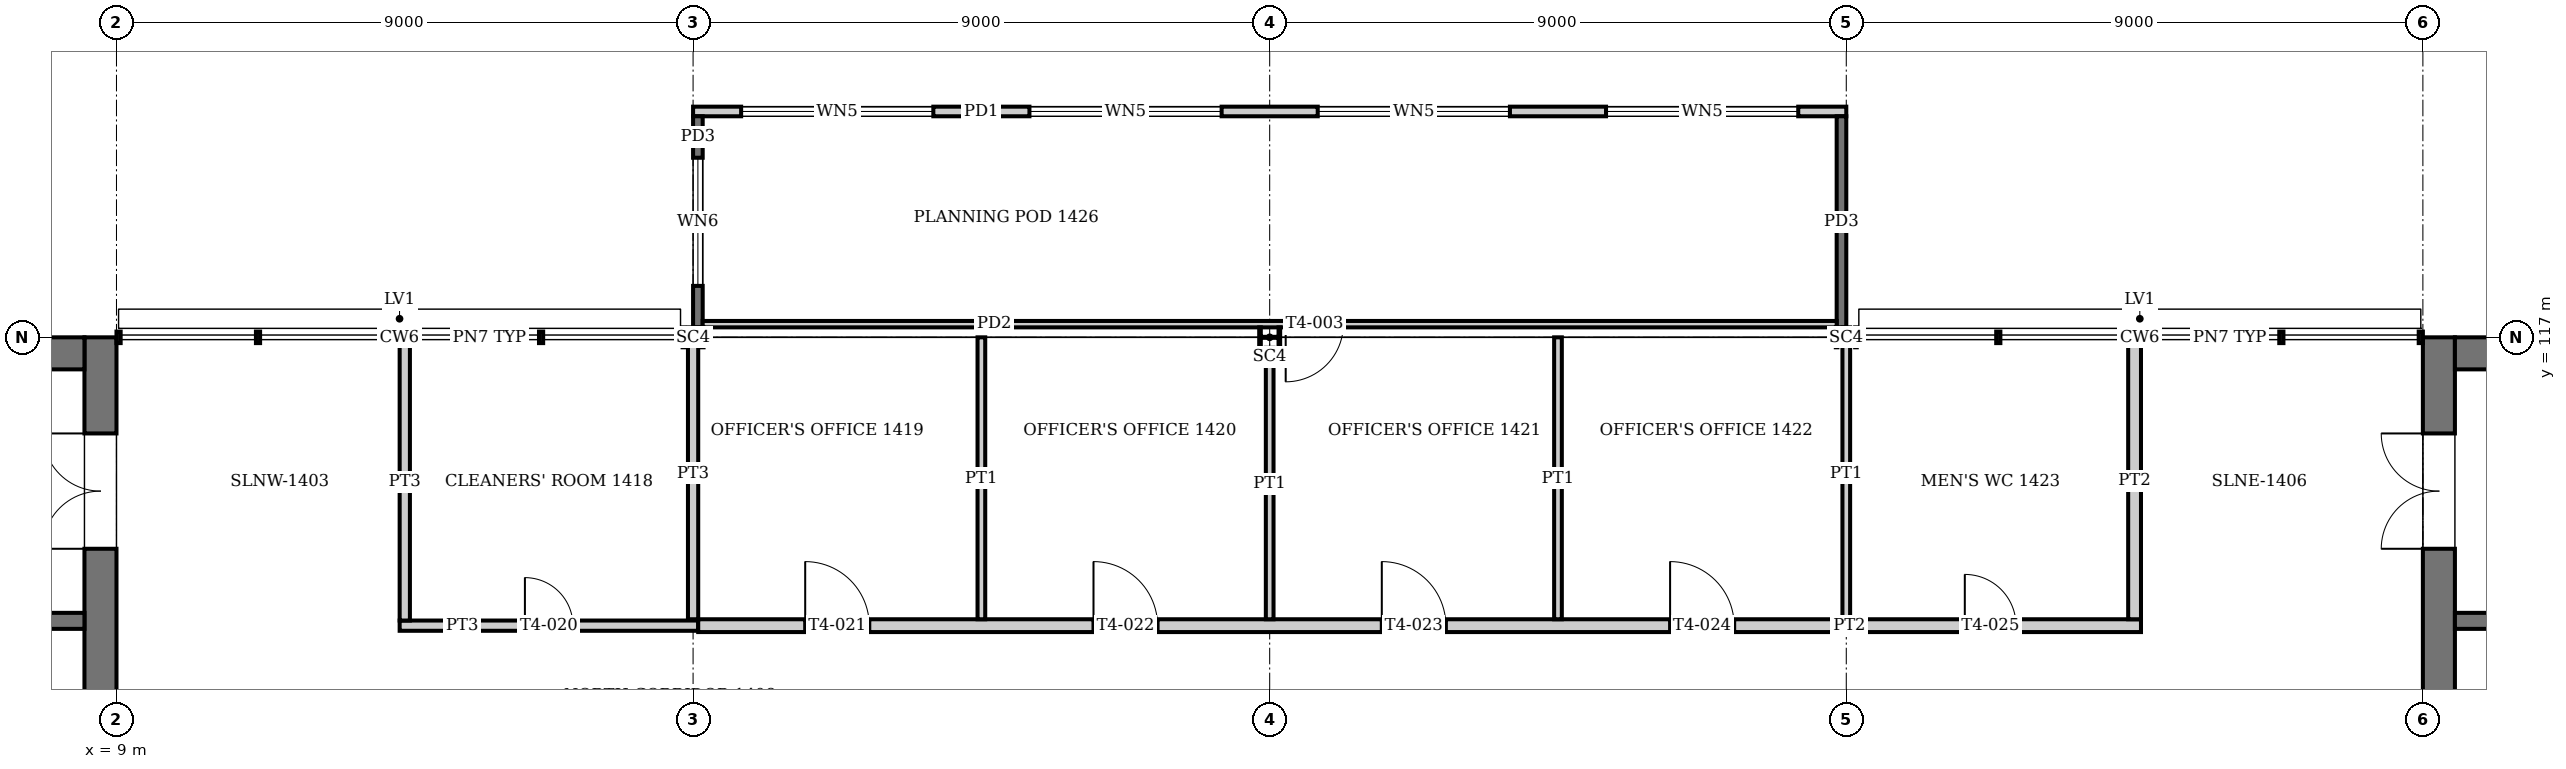
"""IFC4 building model, lengths in metres.
Left out: names, types, materials, properties, quantities, classifications, styles, units other than length and angle.
Written with IfcOpenShell. Run it as: python <this file> out.ifc"""

import sys

from ifc_helpers import new_model, si_unit, direction, frame, frame_2d, origin, origin_2d, place, context, subcontext, project, spatial, rectangle, i_section, extrude, element, fill, save


model = new_model("IFC4")
c1 = context("Model", 3, precision=1e-05, world=origin(), true_north=direction((0.0, 1.0)))
c2 = subcontext(c1, "Body", "Model", "MODEL_VIEW")
j1 = project(units=[si_unit("LENGTHUNIT", "METRE"), si_unit("PLANEANGLEUNIT", "RADIAN")], contexts=[c1])
p1 = place(None, origin())
s1 = spatial("IfcSite", under=j1, at=p1, CompositionType="ELEMENT")
p2 = place(p1, origin())
s2 = spatial("IfcBuilding", under=s1, at=p2, CompositionType="ELEMENT")
p3 = place(p2, frame((0.0, 0.0, 59.2)))
s3 = spatial("IfcBuildingStorey", under=s2, at=p3, CompositionType="ELEMENT", Elevation=59.2)
for number, where, z_axis, x_axis in (
    (1, (18.0, 117.0, 0.0), (0.0, 0.0, 1.0), (0.0, 1.0, 0.0)),
    (2, (27.0, 117.0, 0.0), (0.0, 0.0, 1.0), (0.0, 1.0, 0.0)),
    (3, (36.0, 117.0, 0.0), (0.0, 0.0, 1.0), (0.0, 1.0, 0.0)),
):
    element("IfcColumn", number, at=place(p3, frame(where, z_axis=z_axis, x_axis=x_axis)), inside=s3, PredefinedType="COLUMN", context=c2, shape_type="SweptSolid", body=[
        extrude(i_section(OverallWidth=0.311, OverallDepth=0.327, WebThickness=0.016, FlangeThickness=0.025, at=origin_2d()), origin(), (0.0, 0.0, 1.0), 4.0),
    ])
p4 = place(p3, frame((8.75, 99.0, 0.0), z_axis=(0.0, 0.0, 1.0), x_axis=(0.0, 1.0, 0.0)))
e4 = element("IfcWall", 4, at=p4, inside=s3, PredefinedType="SHEAR", context=c2, shape_type="SweptSolid", body=[
    extrude(rectangle(XDim=18.0, YDim=0.5, at=frame_2d((9.0, 0.0))), origin(), (0.0, 0.0, 1.0), 4.0),
])
p5 = place(p4, frame((1.5, 0.0, 0.0)))
e5 = element("IfcOpeningElement", 5, at=p5, cuts=e4, PredefinedType="OPENING", context=c2, shape_type="SweptSolid", body=[
    extrude(rectangle(XDim=1.8, YDim=2.1, at=frame_2d((0.9, 1.05))), frame((0.0, 0.26, 0.0), z_axis=(0.0, -1.0, 0.0), x_axis=(1.0, 0.0, 0.0)), (0.0, 0.0, 1.0), 0.52),
])
p6 = place(p4, frame((14.7, 0.0, 0.0)))
e6 = element("IfcOpeningElement", 6, at=p6, cuts=e4, PredefinedType="OPENING", context=c2, shape_type="SweptSolid", body=[
    extrude(rectangle(XDim=1.8, YDim=2.1, at=frame_2d((0.9, 1.05))), frame((0.0, 0.26, 0.0), z_axis=(0.0, -1.0, 0.0), x_axis=(1.0, 0.0, 0.0)), (0.0, 0.0, 1.0), 0.52),
])
p7 = place(p4, frame((7.5, 0.0, 0.0)))
e7 = element("IfcOpeningElement", 7, at=p7, cuts=e4, PredefinedType="OPENING", context=c2, shape_type="SweptSolid", body=[
    extrude(rectangle(XDim=1.8, YDim=2.1, at=frame_2d((0.9, 1.05))), frame((0.0, 0.26, 0.0), z_axis=(0.0, -1.0, 0.0), x_axis=(1.0, 0.0, 0.0)), (0.0, 0.0, 1.0), 0.52),
])
p8 = place(p3, frame((0.5, 116.75, 0.0), z_axis=(0.0, 0.0, 1.0), x_axis=(1.0, 0.0, 0.0)))
e8 = element("IfcWall", 8, at=p8, inside=s3, PredefinedType="SHEAR", context=c2, shape_type="SweptSolid", body=[
    extrude(rectangle(XDim=8.0, YDim=0.5, at=frame_2d((4.0, 0.0))), origin(), (0.0, 0.0, 1.0), 4.0),
])
p9 = place(p3, frame((45.25, 99.0, 0.0), z_axis=(0.0, 0.0, 1.0), x_axis=(0.0, 1.0, 0.0)))
e9 = element("IfcWall", 9, at=p9, inside=s3, PredefinedType="SHEAR", context=c2, shape_type="SweptSolid", body=[
    extrude(rectangle(XDim=18.0, YDim=0.5, at=frame_2d((9.0, 0.0))), origin(), (0.0, 0.0, 1.0), 4.0),
])
p10 = place(p9, frame((1.5, 0.0, 0.0)))
e10 = element("IfcOpeningElement", 10, at=p10, cuts=e9, PredefinedType="OPENING", context=c2, shape_type="SweptSolid", body=[
    extrude(rectangle(XDim=1.8, YDim=2.1, at=frame_2d((0.9, 1.05))), frame((0.0, 0.26, 0.0), z_axis=(0.0, -1.0, 0.0), x_axis=(1.0, 0.0, 0.0)), (0.0, 0.0, 1.0), 0.52),
])
p11 = place(p9, frame((14.7, 0.0, 0.0)))
e11 = element("IfcOpeningElement", 11, at=p11, cuts=e9, PredefinedType="OPENING", context=c2, shape_type="SweptSolid", body=[
    extrude(rectangle(XDim=1.8, YDim=2.1, at=frame_2d((0.9, 1.05))), frame((0.0, 0.26, 0.0), z_axis=(0.0, -1.0, 0.0), x_axis=(1.0, 0.0, 0.0)), (0.0, 0.0, 1.0), 0.52),
])
p12 = place(p9, frame((7.5, 0.0, 0.0)))
e12 = element("IfcOpeningElement", 12, at=p12, cuts=e9, PredefinedType="OPENING", context=c2, shape_type="SweptSolid", body=[
    extrude(rectangle(XDim=1.8, YDim=2.1, at=frame_2d((0.9, 1.05))), frame((0.0, 0.26, 0.0), z_axis=(0.0, -1.0, 0.0), x_axis=(1.0, 0.0, 0.0)), (0.0, 0.0, 1.0), 0.52),
])
p13 = place(p3, frame((45.5, 116.75, 0.0), z_axis=(0.0, 0.0, 1.0), x_axis=(1.0, 0.0, 0.0)))
e13 = element("IfcWall", 13, at=p13, inside=s3, PredefinedType="SHEAR", context=c2, shape_type="SweptSolid", body=[
    extrude(rectangle(XDim=8.0, YDim=0.5, at=frame_2d((4.0, 0.0))), origin(), (0.0, 0.0, 1.0), 4.0),
])
p14 = place(p3, frame((18.0, 120.525, 0.0), z_axis=(0.0, 0.0, 1.0), x_axis=(1.0, 0.0, 0.0)))
e14 = element("IfcWall", 14, at=p14, inside=s3, PredefinedType="SOLIDWALL", context=c2, shape_type="SweptSolid", body=[
    extrude(rectangle(XDim=18.0, YDim=0.15, at=frame_2d((9.0, 0.0))), origin(), (0.0, 0.0, 1.0), 2.6),
])
p15 = place(p14, frame((0.75, 0.0, 0.9)))
e15 = element("IfcOpeningElement", 15, at=p15, cuts=e14, PredefinedType="OPENING", context=c2, shape_type="SweptSolid", body=[
    extrude(rectangle(XDim=3.0, YDim=1.4, at=frame_2d((1.5, 0.7))), frame((0.0, 0.085, 0.0), z_axis=(0.0, -1.0, 0.0), x_axis=(1.0, 0.0, 0.0)), (0.0, 0.0, 1.0), 0.17),
])
p16 = place(p14, frame((5.25, 0.0, 0.9)))
e16 = element("IfcOpeningElement", 16, at=p16, cuts=e14, PredefinedType="OPENING", context=c2, shape_type="SweptSolid", body=[
    extrude(rectangle(XDim=3.0, YDim=1.4, at=frame_2d((1.5, 0.7))), frame((0.0, 0.085, 0.0), z_axis=(0.0, -1.0, 0.0), x_axis=(1.0, 0.0, 0.0)), (0.0, 0.0, 1.0), 0.17),
])
p17 = place(p14, frame((9.75, 0.0, 0.9)))
e17 = element("IfcOpeningElement", 17, at=p17, cuts=e14, PredefinedType="OPENING", context=c2, shape_type="SweptSolid", body=[
    extrude(rectangle(XDim=3.0, YDim=1.4, at=frame_2d((1.5, 0.7))), frame((0.0, 0.085, 0.0), z_axis=(0.0, -1.0, 0.0), x_axis=(1.0, 0.0, 0.0)), (0.0, 0.0, 1.0), 0.17),
])
p18 = place(p14, frame((14.25, 0.0, 0.9)))
e18 = element("IfcOpeningElement", 18, at=p18, cuts=e14, PredefinedType="OPENING", context=c2, shape_type="SweptSolid", body=[
    extrude(rectangle(XDim=3.0, YDim=1.4, at=frame_2d((1.5, 0.7))), frame((0.0, 0.085, 0.0), z_axis=(0.0, -1.0, 0.0), x_axis=(1.0, 0.0, 0.0)), (0.0, 0.0, 1.0), 0.17),
])
p19 = place(p3, frame((18.075, 120.45, -0.15), z_axis=(0.0, 0.0, 1.0), x_axis=(0.0, -1.0, 0.0)))
e19 = element("IfcWall", 19, at=p19, inside=s3, PredefinedType="SOLIDWALL", context=c2, shape_type="SweptSolid", body=[
    extrude(rectangle(XDim=3.294, YDim=0.15, at=frame_2d((1.647, 0.0))), origin(), (0.0, 0.0, 1.0), 2.75),
])
p20 = place(p19, frame((0.647, 0.0, 1.05)))
e20 = element("IfcOpeningElement", 20, at=p20, cuts=e19, PredefinedType="OPENING", context=c2, shape_type="SweptSolid", body=[
    extrude(rectangle(XDim=2.0, YDim=1.4, at=frame_2d((1.0, 0.7))), frame((0.0, 0.085, 0.0), z_axis=(0.0, -1.0, 0.0), x_axis=(1.0, 0.0, 0.0)), (0.0, 0.0, 1.0), 0.17),
])
p21 = place(p3, frame((35.925, 120.45, -0.15), z_axis=(0.0, 0.0, 1.0), x_axis=(0.0, -1.0, 0.0)))
e21 = element("IfcWall", 21, at=p21, inside=s3, PredefinedType="SOLIDWALL", context=c2, shape_type="SweptSolid", body=[
    extrude(rectangle(XDim=3.294, YDim=0.15, at=frame_2d((1.647, 0.0))), origin(), (0.0, 0.0, 1.0), 2.75),
])
p22 = place(p3, frame((18.15, 117.206, 0.0), z_axis=(0.0, 0.0, 1.0), x_axis=(1.0, 0.0, 0.0)))
e22 = element("IfcWall", 22, at=p22, inside=s3, PredefinedType="PARTITIONING", context=c2, shape_type="SweptSolid", body=[
    extrude(rectangle(XDim=17.7, YDim=0.1, at=frame_2d((8.85, 0.0))), origin(), (0.0, 0.0, 1.0), 2.6),
])
p23 = place(p22, frame((9.1, 0.0, 0.0)))
e23 = element("IfcOpeningElement", 23, at=p23, cuts=e22, PredefinedType="OPENING", context=c2, shape_type="SweptSolid", body=[
    extrude(rectangle(XDim=0.9, YDim=2.1, at=frame_2d((0.45, 1.05))), frame((0.0, 0.06, 0.0), z_axis=(0.0, -1.0, 0.0), x_axis=(1.0, 0.0, 0.0)), (0.0, 0.0, 1.0), 0.12),
])
for number, where, z_axis, x_axis in (
    (24, (8.5, 112.575, 0.0), (0.0, 0.0, 1.0), (-1.0, 0.0, 0.0)),
    (25, (45.5, 112.575, 0.0), (0.0, 0.0, 1.0), (1.0, 0.0, 0.0)),
):
    element("IfcWall", number, at=place(p3, frame(where, z_axis=z_axis, x_axis=x_axis)), inside=s3, PredefinedType="SOLIDWALL", context=c2, shape_type="SweptSolid", body=[
        extrude(rectangle(XDim=8.0, YDim=0.25, at=frame_2d((4.0, 0.0))), origin(), (0.0, 0.0, 1.0), 3.75),
    ])
p24 = place(p3, frame((13.42, 112.5, 0.0), z_axis=(0.0, 0.0, 1.0), x_axis=(1.0, 0.0, 0.0)))
e26 = element("IfcWall", 26, at=p24, inside=s3, PredefinedType="PARTITIONING", context=c2, shape_type="SweptSolid", body=[
    extrude(rectangle(XDim=4.66, YDim=0.16, at=frame_2d((2.33, 0.0))), origin(), (0.0, 0.0, 1.0), 3.05),
])
p25 = place(p24, frame((1.955, 0.0, 0.0)))
e27 = element("IfcOpeningElement", 27, at=p25, cuts=e26, PredefinedType="OPENING", context=c2, shape_type="SweptSolid", body=[
    extrude(rectangle(XDim=0.75, YDim=2.1, at=frame_2d((0.375, 1.05))), frame((0.0, 0.09, 0.0), z_axis=(0.0, -1.0, 0.0), x_axis=(1.0, 0.0, 0.0)), (0.0, 0.0, 1.0), 0.18),
])
p26 = place(p3, frame((18.08, 112.5, 0.0), z_axis=(0.0, 0.0, 1.0), x_axis=(1.0, 0.0, 0.0)))
e28 = element("IfcWall", 28, at=p26, inside=s3, PredefinedType="PARTITIONING", context=c2, shape_type="SweptSolid", body=[
    extrude(rectangle(XDim=22.52, YDim=0.2, at=frame_2d((11.26, 0.0))), origin(), (0.0, 0.0, 1.0), 3.05),
])
p27 = place(p26, frame((1.67, 0.0, 0.0)))
e29 = element("IfcOpeningElement", 29, at=p27, cuts=e28, PredefinedType="OPENING", context=c2, shape_type="SweptSolid", body=[
    extrude(rectangle(XDim=1.0, YDim=2.1, at=frame_2d((0.5, 1.05))), frame((0.0, 0.11, 0.0), z_axis=(0.0, -1.0, 0.0), x_axis=(1.0, 0.0, 0.0)), (0.0, 0.0, 1.0), 0.22),
])
p28 = place(p26, frame((6.17, 0.0, 0.0)))
e30 = element("IfcOpeningElement", 30, at=p28, cuts=e28, PredefinedType="OPENING", context=c2, shape_type="SweptSolid", body=[
    extrude(rectangle(XDim=1.0, YDim=2.1, at=frame_2d((0.5, 1.05))), frame((0.0, 0.11, 0.0), z_axis=(0.0, -1.0, 0.0), x_axis=(1.0, 0.0, 0.0)), (0.0, 0.0, 1.0), 0.22),
])
p29 = place(p26, frame((10.67, 0.0, 0.0)))
e31 = element("IfcOpeningElement", 31, at=p29, cuts=e28, PredefinedType="OPENING", context=c2, shape_type="SweptSolid", body=[
    extrude(rectangle(XDim=1.0, YDim=2.1, at=frame_2d((0.5, 1.05))), frame((0.0, 0.11, 0.0), z_axis=(0.0, -1.0, 0.0), x_axis=(1.0, 0.0, 0.0)), (0.0, 0.0, 1.0), 0.22),
])
p30 = place(p26, frame((15.17, 0.0, 0.0)))
e32 = element("IfcOpeningElement", 32, at=p30, cuts=e28, PredefinedType="OPENING", context=c2, shape_type="SweptSolid", body=[
    extrude(rectangle(XDim=1.0, YDim=2.1, at=frame_2d((0.5, 1.05))), frame((0.0, 0.11, 0.0), z_axis=(0.0, -1.0, 0.0), x_axis=(1.0, 0.0, 0.0)), (0.0, 0.0, 1.0), 0.22),
])
p31 = place(p26, frame((19.77, 0.0, 0.0)))
e33 = element("IfcOpeningElement", 33, at=p31, cuts=e28, PredefinedType="OPENING", context=c2, shape_type="SweptSolid", body=[
    extrude(rectangle(XDim=0.8, YDim=2.1, at=frame_2d((0.4, 1.05))), frame((0.0, 0.11, 0.0), z_axis=(0.0, -1.0, 0.0), x_axis=(1.0, 0.0, 0.0)), (0.0, 0.0, 1.0), 0.22),
])
p32 = place(p3, frame((13.5, 112.58, 0.0), z_axis=(0.0, 0.0, 1.0), x_axis=(0.0, 1.0, 0.0)))
e34 = element("IfcWall", 34, at=p32, inside=s3, PredefinedType="PARTITIONING", context=c2, shape_type="SweptSolid", body=[
    extrude(rectangle(XDim=4.33, YDim=0.16, at=frame_2d((2.165, 0.0))), origin(), (0.0, 0.0, 1.0), 3.05),
])
p33 = place(p3, frame((18.0, 112.6, 0.0), z_axis=(0.0, 0.0, 1.0), x_axis=(0.0, 1.0, 0.0)))
e35 = element("IfcWall", 35, at=p33, inside=s3, PredefinedType="PARTITIONING", context=c2, shape_type="SweptSolid", body=[
    extrude(rectangle(XDim=4.555, YDim=0.16, at=frame_2d((2.278, 0.0))), origin(), (0.0, 0.0, 1.0), 3.05),
])
p34 = place(p3, frame((22.5, 112.6, 0.0), z_axis=(0.0, 0.0, 1.0), x_axis=(0.0, 1.0, 0.0)))
e36 = element("IfcWall", 36, at=p34, inside=s3, PredefinedType="PARTITIONING", context=c2, shape_type="SweptSolid", body=[
    extrude(rectangle(XDim=4.4, YDim=0.12, at=frame_2d((2.2, 0.0))), origin(), (0.0, 0.0, 1.0), 3.05),
])
p35 = place(p3, frame((27.0, 112.6, 0.0), z_axis=(0.0, 0.0, 1.0), x_axis=(0.0, 1.0, 0.0)))
e37 = element("IfcWall", 37, at=p35, inside=s3, PredefinedType="PARTITIONING", context=c2, shape_type="SweptSolid", body=[
    extrude(rectangle(XDim=4.236, YDim=0.12, at=frame_2d((2.118, 0.0))), origin(), (0.0, 0.0, 1.0), 3.05),
])
p36 = place(p3, frame((31.5, 112.6, 0.0), z_axis=(0.0, 0.0, 1.0), x_axis=(0.0, 1.0, 0.0)))
e38 = element("IfcWall", 38, at=p36, inside=s3, PredefinedType="PARTITIONING", context=c2, shape_type="SweptSolid", body=[
    extrude(rectangle(XDim=4.4, YDim=0.12, at=frame_2d((2.2, 0.0))), origin(), (0.0, 0.0, 1.0), 3.05),
])
p37 = place(p3, frame((36.0, 112.6, 0.0), z_axis=(0.0, 0.0, 1.0), x_axis=(0.0, 1.0, 0.0)))
e39 = element("IfcWall", 39, at=p37, inside=s3, PredefinedType="PARTITIONING", context=c2, shape_type="SweptSolid", body=[
    extrude(rectangle(XDim=4.555, YDim=0.12, at=frame_2d((2.278, 0.0))), origin(), (0.0, 0.0, 1.0), 3.05),
])
p38 = place(p3, frame((40.5, 112.6, 0.0), z_axis=(0.0, 0.0, 1.0), x_axis=(0.0, 1.0, 0.0)))
e40 = element("IfcWall", 40, at=p38, inside=s3, PredefinedType="PARTITIONING", context=c2, shape_type="SweptSolid", body=[
    extrude(rectangle(XDim=4.31, YDim=0.2, at=frame_2d((2.155, 0.0))), origin(), (0.0, 0.0, 1.0), 3.05),
])
p39 = place(p15, origin())
e41 = element("IfcWindow", 41, at=p39, inside=s3, PartitioningType="SINGLE_PANEL", PredefinedType="WINDOW", context=c2, shape_type="SweptSolid", body=[
    extrude(rectangle(XDim=3.0, YDim=1.4, at=frame_2d((1.5, 0.7))), frame((0.0, 0.03, 0.0), z_axis=(0.0, -1.0, 0.0), x_axis=(1.0, 0.0, 0.0)), (0.0, 0.0, 1.0), 0.06),
])
fill(e15, e41)
p40 = place(p16, origin())
e42 = element("IfcWindow", 42, at=p40, inside=s3, PartitioningType="SINGLE_PANEL", PredefinedType="WINDOW", context=c2, shape_type="SweptSolid", body=[
    extrude(rectangle(XDim=3.0, YDim=1.4, at=frame_2d((1.5, 0.7))), frame((0.0, 0.03, 0.0), z_axis=(0.0, -1.0, 0.0), x_axis=(1.0, 0.0, 0.0)), (0.0, 0.0, 1.0), 0.06),
])
fill(e16, e42)
p41 = place(p17, origin())
e43 = element("IfcWindow", 43, at=p41, inside=s3, PartitioningType="SINGLE_PANEL", PredefinedType="WINDOW", context=c2, shape_type="SweptSolid", body=[
    extrude(rectangle(XDim=3.0, YDim=1.4, at=frame_2d((1.5, 0.7))), frame((0.0, 0.03, 0.0), z_axis=(0.0, -1.0, 0.0), x_axis=(1.0, 0.0, 0.0)), (0.0, 0.0, 1.0), 0.06),
])
fill(e17, e43)
p42 = place(p18, origin())
e44 = element("IfcWindow", 44, at=p42, inside=s3, PartitioningType="SINGLE_PANEL", PredefinedType="WINDOW", context=c2, shape_type="SweptSolid", body=[
    extrude(rectangle(XDim=3.0, YDim=1.4, at=frame_2d((1.5, 0.7))), frame((0.0, 0.03, 0.0), z_axis=(0.0, -1.0, 0.0), x_axis=(1.0, 0.0, 0.0)), (0.0, 0.0, 1.0), 0.06),
])
fill(e18, e44)
p43 = place(p20, origin())
e45 = element("IfcWindow", 45, at=p43, inside=s3, PartitioningType="SINGLE_PANEL", PredefinedType="WINDOW", context=c2, shape_type="SweptSolid", body=[
    extrude(rectangle(XDim=2.0, YDim=1.4, at=frame_2d((1.0, 0.7))), frame((0.0, 0.03, 0.0), z_axis=(0.0, -1.0, 0.0), x_axis=(1.0, 0.0, 0.0)), (0.0, 0.0, 1.0), 0.06),
])
fill(e20, e45)
p44 = place(p23, frame((0.9, 0.0, 0.0), z_axis=(0.0, 0.0, 1.0), x_axis=(-1.0, 0.0, 0.0)))
e46 = element("IfcDoor", 46, at=p44, inside=s3, OperationType="SINGLE_SWING_RIGHT", PredefinedType="DOOR", context=c2, shape_type="SweptSolid", body=[
    extrude(rectangle(XDim=0.9, YDim=2.1, at=frame_2d((0.45, 1.05))), frame((0.0, 0.025, 0.0), z_axis=(0.0, -1.0, 0.0), x_axis=(1.0, 0.0, 0.0)), (0.0, 0.0, 1.0), 0.05),
])
fill(e23, e46)
p45 = place(p25, origin())
e47 = element("IfcDoor", 47, at=p45, inside=s3, OperationType="SINGLE_SWING_LEFT", PredefinedType="DOOR", context=c2, shape_type="SweptSolid", body=[
    extrude(rectangle(XDim=0.75, YDim=2.1, at=frame_2d((0.375, 1.05))), frame((0.0, 0.025, 0.0), z_axis=(0.0, -1.0, 0.0), x_axis=(1.0, 0.0, 0.0)), (0.0, 0.0, 1.0), 0.05),
])
fill(e27, e47)
p46 = place(p27, origin())
e48 = element("IfcDoor", 48, at=p46, inside=s3, OperationType="SINGLE_SWING_LEFT", PredefinedType="DOOR", context=c2, shape_type="SweptSolid", body=[
    extrude(rectangle(XDim=1.0, YDim=2.1, at=frame_2d((0.5, 1.05))), frame((0.0, 0.025, 0.0), z_axis=(0.0, -1.0, 0.0), x_axis=(1.0, 0.0, 0.0)), (0.0, 0.0, 1.0), 0.05),
])
fill(e29, e48)
p47 = place(p28, origin())
e49 = element("IfcDoor", 49, at=p47, inside=s3, OperationType="SINGLE_SWING_LEFT", PredefinedType="DOOR", context=c2, shape_type="SweptSolid", body=[
    extrude(rectangle(XDim=1.0, YDim=2.1, at=frame_2d((0.5, 1.05))), frame((0.0, 0.025, 0.0), z_axis=(0.0, -1.0, 0.0), x_axis=(1.0, 0.0, 0.0)), (0.0, 0.0, 1.0), 0.05),
])
fill(e30, e49)
p48 = place(p29, origin())
e50 = element("IfcDoor", 50, at=p48, inside=s3, OperationType="SINGLE_SWING_LEFT", PredefinedType="DOOR", context=c2, shape_type="SweptSolid", body=[
    extrude(rectangle(XDim=1.0, YDim=2.1, at=frame_2d((0.5, 1.05))), frame((0.0, 0.025, 0.0), z_axis=(0.0, -1.0, 0.0), x_axis=(1.0, 0.0, 0.0)), (0.0, 0.0, 1.0), 0.05),
])
fill(e31, e50)
p49 = place(p30, origin())
e51 = element("IfcDoor", 51, at=p49, inside=s3, OperationType="SINGLE_SWING_LEFT", PredefinedType="DOOR", context=c2, shape_type="SweptSolid", body=[
    extrude(rectangle(XDim=1.0, YDim=2.1, at=frame_2d((0.5, 1.05))), frame((0.0, 0.025, 0.0), z_axis=(0.0, -1.0, 0.0), x_axis=(1.0, 0.0, 0.0)), (0.0, 0.0, 1.0), 0.05),
])
fill(e32, e51)
p50 = place(p31, origin())
e52 = element("IfcDoor", 52, at=p50, inside=s3, OperationType="SINGLE_SWING_LEFT", PredefinedType="DOOR", context=c2, shape_type="SweptSolid", body=[
    extrude(rectangle(XDim=0.8, YDim=2.1, at=frame_2d((0.4, 1.05))), frame((0.0, 0.025, 0.0), z_axis=(0.0, -1.0, 0.0), x_axis=(1.0, 0.0, 0.0)), (0.0, 0.0, 1.0), 0.05),
])
fill(e33, e52)
p51 = place(p6, origin())
e53 = element("IfcDoor", 53, at=p51, inside=s3, OperationType="DOUBLE_DOOR_SINGLE_SWING", PredefinedType="DOOR", context=c2, shape_type="SweptSolid", body=[
    extrude(rectangle(XDim=1.8, YDim=2.1, at=frame_2d((0.9, 1.05))), frame((0.0, 0.025, 0.0), z_axis=(0.0, -1.0, 0.0), x_axis=(1.0, 0.0, 0.0)), (0.0, 0.0, 1.0), 0.05),
])
fill(e6, e53)
p52 = place(p11, origin())
e54 = element("IfcDoor", 54, at=p52, inside=s3, OperationType="DOUBLE_DOOR_SINGLE_SWING", PredefinedType="DOOR", context=c2, shape_type="SweptSolid", body=[
    extrude(rectangle(XDim=1.8, YDim=2.1, at=frame_2d((0.9, 1.05))), frame((0.0, 0.025, 0.0), z_axis=(0.0, -1.0, 0.0), x_axis=(1.0, 0.0, 0.0)), (0.0, 0.0, 1.0), 0.05),
])
fill(e11, e54)
save(model, sys.argv[1])
